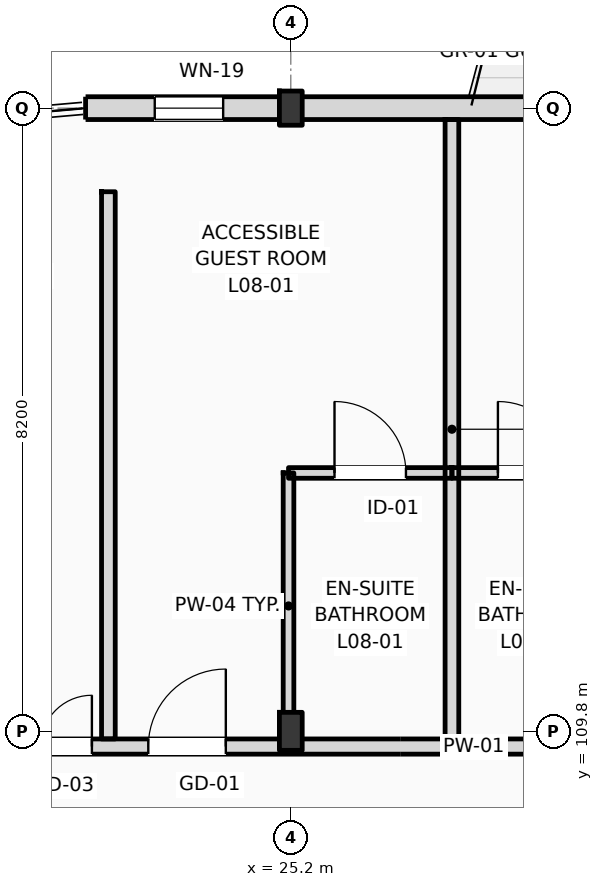
"""IFC4 building model, lengths in metres.
Left out: names, types, materials, properties, quantities, classifications, styles, units other than length and angle.
Written with IfcOpenShell. Run it as: python <this file> out.ifc"""

import sys

from ifc_helpers import new_model, si_unit, direction, frame, frame_2d, origin, origin_2d, place, context, subcontext, project, spatial, rectangle, i_section, extrude, element, fill, save


model = new_model("IFC4")
c1 = context("Model", 3, precision=1e-05, world=origin(), true_north=direction((0.0, 1.0)))
c2 = subcontext(c1, "Body", "Model", "MODEL_VIEW")
j1 = project(units=[si_unit("LENGTHUNIT", "METRE"), si_unit("PLANEANGLEUNIT", "RADIAN")], contexts=[c1])
p1 = place(None, origin())
s1 = spatial("IfcSite", under=j1, at=p1, CompositionType="ELEMENT")
p2 = place(p1, origin())
s2 = spatial("IfcBuilding", under=s1, at=p2, CompositionType="ELEMENT")
p3 = place(p2, frame((0.0, 0.0, 35.4)))
s3 = spatial("IfcBuildingStorey", under=s2, at=p3, CompositionType="ELEMENT", Elevation=35.4)
p4 = place(p3, frame((25.2, 109.8, 0.0), z_axis=(0.0, 0.0, 1.0), x_axis=(1.0, 0.0, 0.0)))
e1 = element("IfcColumn", 1, at=p4, inside=s3, PredefinedType="COLUMN", context=c2, shape_type="SweptSolid", body=[
    extrude(i_section(OverallWidth=0.3, OverallDepth=0.5, WebThickness=0.014, FlangeThickness=0.028, FilletRadius=0.027, at=origin_2d()), origin(), (0.0, 0.0, 1.0), 3.6),
])
p5 = place(p3, frame((25.2, 118.0, 0.0), z_axis=(0.0, 0.0, 1.0), x_axis=(1.0, 0.0, 0.0)))
e2 = element("IfcColumn", 2, at=p5, inside=s3, PredefinedType="COLUMN", context=c2, shape_type="SweptSolid", body=[
    extrude(i_section(OverallWidth=0.3, OverallDepth=0.45, WebThickness=0.014, FlangeThickness=0.026, FilletRadius=0.027, at=origin_2d()), origin(), (0.0, 0.0, 1.0), 3.6),
])
p6 = place(p3, frame((22.5, 118.0, 0.0), z_axis=(0.0, 0.0, 1.0), x_axis=(1.0, 0.0, 0.0)))
e3 = element("IfcWall", 3, at=p6, inside=s3, PredefinedType="STANDARD", context=c2, shape_type="SweptSolid", body=[
    extrude(rectangle(XDim=72.9, YDim=0.3, at=frame_2d((36.45, 0.0))), origin(), (0.0, 0.0, 1.0), 2.92),
])
p7 = place(p6, frame((0.91, 0.0, 0.9)))
e4 = element("IfcOpeningElement", 4, at=p7, cuts=e3, PredefinedType="OPENING", context=c2, shape_type="SweptSolid", body=[
    extrude(rectangle(XDim=0.9, YDim=1.84, at=frame_2d((0.45, 0.92))), frame((0.0, 0.16, 0.0), z_axis=(0.0, -1.0, 0.0), x_axis=(1.0, 0.0, 0.0)), (0.0, 0.0, 1.0), 0.32),
])
p8 = place(p6, frame((6.665, 0.0, 0.0)))
e5 = element("IfcOpeningElement", 5, at=p8, cuts=e3, PredefinedType="OPENING", context=c2, shape_type="SweptSolid", body=[
    extrude(rectangle(XDim=1.2, YDim=2.25, at=frame_2d((0.6, 1.125))), frame((0.0, 0.16, 0.0), z_axis=(0.0, -1.0, 0.0), x_axis=(1.0, 0.0, 0.0)), (0.0, 0.0, 1.0), 0.32),
])
p9 = place(p6, frame((11.355, 0.0, 0.9)))
e6 = element("IfcOpeningElement", 6, at=p9, cuts=e3, PredefinedType="OPENING", context=c2, shape_type="SweptSolid", body=[
    extrude(rectangle(XDim=1.1, YDim=1.5, at=frame_2d((0.55, 0.75))), frame((0.0, 0.16, 0.0), z_axis=(0.0, -1.0, 0.0), x_axis=(1.0, 0.0, 0.0)), (0.0, 0.0, 1.0), 0.32),
])
p10 = place(p6, frame((15.58, 0.0, 0.9)))
e7 = element("IfcOpeningElement", 7, at=p10, cuts=e3, PredefinedType="OPENING", context=c2, shape_type="SweptSolid", body=[
    extrude(rectangle(XDim=1.25, YDim=1.6, at=frame_2d((0.625, 0.8))), frame((0.0, 0.16, 0.0), z_axis=(0.0, -1.0, 0.0), x_axis=(1.0, 0.0, 0.0)), (0.0, 0.0, 1.0), 0.32),
])
p11 = place(p6, frame((21.08, 0.0, 0.0)))
e8 = element("IfcOpeningElement", 8, at=p11, cuts=e3, PredefinedType="OPENING", context=c2, shape_type="SweptSolid", body=[
    extrude(rectangle(XDim=1.2, YDim=2.25, at=frame_2d((0.6, 1.125))), frame((0.0, 0.16, 0.0), z_axis=(0.0, -1.0, 0.0), x_axis=(1.0, 0.0, 0.0)), (0.0, 0.0, 1.0), 0.32),
])
p12 = place(p6, frame((23.54, 0.0, 0.0)))
e9 = element("IfcOpeningElement", 9, at=p12, cuts=e3, PredefinedType="OPENING", context=c2, shape_type="SweptSolid", body=[
    extrude(rectangle(XDim=1.2, YDim=2.25, at=frame_2d((0.6, 1.125))), frame((0.0, 0.16, 0.0), z_axis=(0.0, -1.0, 0.0), x_axis=(1.0, 0.0, 0.0)), (0.0, 0.0, 1.0), 0.32),
])
p13 = place(p6, frame((28.83, 0.0, 0.9)))
e10 = element("IfcOpeningElement", 10, at=p13, cuts=e3, PredefinedType="OPENING", context=c2, shape_type="SweptSolid", body=[
    extrude(rectangle(XDim=1.75, YDim=1.84, at=frame_2d((0.875, 0.92))), frame((0.0, 0.16, 0.0), z_axis=(0.0, -1.0, 0.0), x_axis=(1.0, 0.0, 0.0)), (0.0, 0.0, 1.0), 0.32),
])
p14 = place(p6, frame((34.805, 0.0, 0.9)))
e11 = element("IfcOpeningElement", 11, at=p14, cuts=e3, PredefinedType="OPENING", context=c2, shape_type="SweptSolid", body=[
    extrude(rectangle(XDim=1.35, YDim=1.84, at=frame_2d((0.675, 0.92))), frame((0.0, 0.16, 0.0), z_axis=(0.0, -1.0, 0.0), x_axis=(1.0, 0.0, 0.0)), (0.0, 0.0, 1.0), 0.32),
])
p15 = place(p6, frame((38.105, 0.0, 0.0)))
e12 = element("IfcOpeningElement", 12, at=p15, cuts=e3, PredefinedType="OPENING", context=c2, shape_type="SweptSolid", body=[
    extrude(rectangle(XDim=1.2, YDim=2.25, at=frame_2d((0.6, 1.125))), frame((0.0, 0.16, 0.0), z_axis=(0.0, -1.0, 0.0), x_axis=(1.0, 0.0, 0.0)), (0.0, 0.0, 1.0), 0.32),
])
p16 = place(p6, frame((42.505, 0.0, 0.9)))
e13 = element("IfcOpeningElement", 13, at=p16, cuts=e3, PredefinedType="OPENING", context=c2, shape_type="SweptSolid", body=[
    extrude(rectangle(XDim=2.6, YDim=1.84, at=frame_2d((1.3, 0.92))), frame((0.0, 0.16, 0.0), z_axis=(0.0, -1.0, 0.0), x_axis=(1.0, 0.0, 0.0)), (0.0, 0.0, 1.0), 0.32),
])
p17 = place(p6, frame((46.2, 0.0, 0.9)))
e14 = element("IfcOpeningElement", 14, at=p17, cuts=e3, PredefinedType="OPENING", context=c2, shape_type="SweptSolid", body=[
    extrude(rectangle(XDim=1.8, YDim=1.84, at=frame_2d((0.9, 0.92))), frame((0.0, 0.16, 0.0), z_axis=(0.0, -1.0, 0.0), x_axis=(1.0, 0.0, 0.0)), (0.0, 0.0, 1.0), 0.32),
])
p18 = place(p6, frame((52.565, 0.0, 0.0)))
e15 = element("IfcOpeningElement", 15, at=p18, cuts=e3, PredefinedType="OPENING", context=c2, shape_type="SweptSolid", body=[
    extrude(rectangle(XDim=1.2, YDim=2.25, at=frame_2d((0.6, 1.125))), frame((0.0, 0.16, 0.0), z_axis=(0.0, -1.0, 0.0), x_axis=(1.0, 0.0, 0.0)), (0.0, 0.0, 1.0), 0.32),
])
p19 = place(p6, frame((55.305, 0.0, 0.9)))
e16 = element("IfcOpeningElement", 16, at=p19, cuts=e3, PredefinedType="OPENING", context=c2, shape_type="SweptSolid", body=[
    extrude(rectangle(XDim=1.2, YDim=1.8, at=frame_2d((0.6, 0.9))), frame((0.0, 0.16, 0.0), z_axis=(0.0, -1.0, 0.0), x_axis=(1.0, 0.0, 0.0)), (0.0, 0.0, 1.0), 0.32),
])
p20 = place(p6, frame((60.53, 0.0, 0.9)))
e17 = element("IfcOpeningElement", 17, at=p20, cuts=e3, PredefinedType="OPENING", context=c2, shape_type="SweptSolid", body=[
    extrude(rectangle(XDim=1.35, YDim=1.84, at=frame_2d((0.675, 0.92))), frame((0.0, 0.16, 0.0), z_axis=(0.0, -1.0, 0.0), x_axis=(1.0, 0.0, 0.0)), (0.0, 0.0, 1.0), 0.32),
])
p21 = place(p6, frame((65.955, 0.0, 0.9)))
e18 = element("IfcOpeningElement", 18, at=p21, cuts=e3, PredefinedType="OPENING", context=c2, shape_type="SweptSolid", body=[
    extrude(rectangle(XDim=1.35, YDim=1.84, at=frame_2d((0.675, 0.92))), frame((0.0, 0.16, 0.0), z_axis=(0.0, -1.0, 0.0), x_axis=(1.0, 0.0, 0.0)), (0.0, 0.0, 1.0), 0.32),
])
p22 = place(p6, frame((69.335, 0.0, 0.9)))
e19 = element("IfcOpeningElement", 19, at=p22, cuts=e3, PredefinedType="OPENING", context=c2, shape_type="SweptSolid", body=[
    extrude(rectangle(XDim=1.65, YDim=1.84, at=frame_2d((0.825, 0.92))), frame((0.0, 0.16, 0.0), z_axis=(0.0, -1.0, 0.0), x_axis=(1.0, 0.0, 0.0)), (0.0, 0.0, 1.0), 0.32),
])
p23 = place(p3, frame((10.65, 109.6, 0.0), z_axis=(0.0, 0.0, 1.0), x_axis=(1.0, 0.0, 0.0)))
e20 = element("IfcWall", 20, at=p23, inside=s3, PredefinedType="PARTITIONING", context=c2, shape_type="SweptSolid", body=[
    extrude(rectangle(XDim=84.61, YDim=0.2, at=frame_2d((42.305, 0.0))), origin(), (0.0, 0.0, 1.0), 2.82),
])
p24 = place(p23, frame((12.675, 0.0, 0.0)))
e21 = element("IfcOpeningElement", 21, at=p24, cuts=e20, PredefinedType="OPENING", context=c2, shape_type="SweptSolid", body=[
    extrude(rectangle(XDim=1.02, YDim=2.2, at=frame_2d((0.51, 1.1))), frame((0.0, 0.11, 0.0), z_axis=(0.0, -1.0, 0.0), x_axis=(1.0, 0.0, 0.0)), (0.0, 0.0, 1.0), 0.22),
])
p25 = place(p23, frame((19.62, 0.0, 0.0)))
e22 = element("IfcOpeningElement", 22, at=p25, cuts=e20, PredefinedType="OPENING", context=c2, shape_type="SweptSolid", body=[
    extrude(rectangle(XDim=1.02, YDim=2.2, at=frame_2d((0.51, 1.1))), frame((0.0, 0.11, 0.0), z_axis=(0.0, -1.0, 0.0), x_axis=(1.0, 0.0, 0.0)), (0.0, 0.0, 1.0), 0.22),
])
p26 = place(p23, frame((24.12, 0.0, 0.0)))
e23 = element("IfcOpeningElement", 23, at=p26, cuts=e20, PredefinedType="OPENING", context=c2, shape_type="SweptSolid", body=[
    extrude(rectangle(XDim=1.02, YDim=2.2, at=frame_2d((0.51, 1.1))), frame((0.0, 0.11, 0.0), z_axis=(0.0, -1.0, 0.0), x_axis=(1.0, 0.0, 0.0)), (0.0, 0.0, 1.0), 0.22),
])
p27 = place(p23, frame((26.47, 0.0, 0.0)))
e24 = element("IfcOpeningElement", 24, at=p27, cuts=e20, PredefinedType="OPENING", context=c2, shape_type="SweptSolid", body=[
    extrude(rectangle(XDim=1.02, YDim=2.2, at=frame_2d((0.51, 1.1))), frame((0.0, 0.11, 0.0), z_axis=(0.0, -1.0, 0.0), x_axis=(1.0, 0.0, 0.0)), (0.0, 0.0, 1.0), 0.22),
])
p28 = place(p23, frame((33.15, 0.0, 0.0)))
e25 = element("IfcOpeningElement", 25, at=p28, cuts=e20, PredefinedType="OPENING", context=c2, shape_type="SweptSolid", body=[
    extrude(rectangle(XDim=0.96, YDim=2.2, at=frame_2d((0.48, 1.1))), frame((0.0, 0.11, 0.0), z_axis=(0.0, -1.0, 0.0), x_axis=(1.0, 0.0, 0.0)), (0.0, 0.0, 1.0), 0.22),
])
p29 = place(p23, frame((35.5, 0.0, 0.0)))
e26 = element("IfcOpeningElement", 26, at=p29, cuts=e20, PredefinedType="OPENING", context=c2, shape_type="SweptSolid", body=[
    extrude(rectangle(XDim=0.96, YDim=2.2, at=frame_2d((0.48, 1.1))), frame((0.0, 0.11, 0.0), z_axis=(0.0, -1.0, 0.0), x_axis=(1.0, 0.0, 0.0)), (0.0, 0.0, 1.0), 0.22),
])
p30 = place(p23, frame((42.15, 0.0, 0.0)))
e27 = element("IfcOpeningElement", 27, at=p30, cuts=e20, PredefinedType="OPENING", context=c2, shape_type="SweptSolid", body=[
    extrude(rectangle(XDim=0.96, YDim=2.2, at=frame_2d((0.48, 1.1))), frame((0.0, 0.11, 0.0), z_axis=(0.0, -1.0, 0.0), x_axis=(1.0, 0.0, 0.0)), (0.0, 0.0, 1.0), 0.22),
])
p31 = place(p23, frame((47.15, 0.0, 0.0)))
e28 = element("IfcOpeningElement", 28, at=p31, cuts=e20, PredefinedType="OPENING", context=c2, shape_type="SweptSolid", body=[
    extrude(rectangle(XDim=0.96, YDim=2.2, at=frame_2d((0.48, 1.1))), frame((0.0, 0.11, 0.0), z_axis=(0.0, -1.0, 0.0), x_axis=(1.0, 0.0, 0.0)), (0.0, 0.0, 1.0), 0.22),
])
p32 = place(p23, frame((51.15, 0.0, 0.0)))
e29 = element("IfcOpeningElement", 29, at=p32, cuts=e20, PredefinedType="OPENING", context=c2, shape_type="SweptSolid", body=[
    extrude(rectangle(XDim=0.96, YDim=2.2, at=frame_2d((0.48, 1.1))), frame((0.0, 0.11, 0.0), z_axis=(0.0, -1.0, 0.0), x_axis=(1.0, 0.0, 0.0)), (0.0, 0.0, 1.0), 0.22),
])
p33 = place(p23, frame((55.65, 0.0, 0.0)))
e30 = element("IfcOpeningElement", 30, at=p33, cuts=e20, PredefinedType="OPENING", context=c2, shape_type="SweptSolid", body=[
    extrude(rectangle(XDim=0.96, YDim=2.2, at=frame_2d((0.48, 1.1))), frame((0.0, 0.11, 0.0), z_axis=(0.0, -1.0, 0.0), x_axis=(1.0, 0.0, 0.0)), (0.0, 0.0, 1.0), 0.22),
])
p34 = place(p23, frame((58.0, 0.0, 0.0)))
e31 = element("IfcOpeningElement", 31, at=p34, cuts=e20, PredefinedType="OPENING", context=c2, shape_type="SweptSolid", body=[
    extrude(rectangle(XDim=0.96, YDim=2.2, at=frame_2d((0.48, 1.1))), frame((0.0, 0.11, 0.0), z_axis=(0.0, -1.0, 0.0), x_axis=(1.0, 0.0, 0.0)), (0.0, 0.0, 1.0), 0.22),
])
p35 = place(p23, frame((64.65, 0.0, 0.0)))
e32 = element("IfcOpeningElement", 32, at=p35, cuts=e20, PredefinedType="OPENING", context=c2, shape_type="SweptSolid", body=[
    extrude(rectangle(XDim=0.96, YDim=2.2, at=frame_2d((0.48, 1.1))), frame((0.0, 0.11, 0.0), z_axis=(0.0, -1.0, 0.0), x_axis=(1.0, 0.0, 0.0)), (0.0, 0.0, 1.0), 0.22),
])
p36 = place(p23, frame((66.75, 0.0, 0.0)))
e33 = element("IfcOpeningElement", 33, at=p36, cuts=e20, PredefinedType="OPENING", context=c2, shape_type="SweptSolid", body=[
    extrude(rectangle(XDim=0.96, YDim=2.2, at=frame_2d((0.48, 1.1))), frame((0.0, 0.11, 0.0), z_axis=(0.0, -1.0, 0.0), x_axis=(1.0, 0.0, 0.0)), (0.0, 0.0, 1.0), 0.22),
])
p37 = place(p23, frame((73.65, 0.0, 0.0)))
e34 = element("IfcOpeningElement", 34, at=p37, cuts=e20, PredefinedType="OPENING", context=c2, shape_type="SweptSolid", body=[
    extrude(rectangle(XDim=0.96, YDim=2.2, at=frame_2d((0.48, 1.1))), frame((0.0, 0.11, 0.0), z_axis=(0.0, -1.0, 0.0), x_axis=(1.0, 0.0, 0.0)), (0.0, 0.0, 1.0), 0.22),
])
p38 = place(p23, frame((78.4, 0.0, 0.0)))
e35 = element("IfcOpeningElement", 35, at=p38, cuts=e20, PredefinedType="OPENING", context=c2, shape_type="SweptSolid", body=[
    extrude(rectangle(XDim=0.96, YDim=2.2, at=frame_2d((0.48, 1.1))), frame((0.0, 0.11, 0.0), z_axis=(0.0, -1.0, 0.0), x_axis=(1.0, 0.0, 0.0)), (0.0, 0.0, 1.0), 0.22),
])
p39 = place(p23, frame((80.455, 0.0, 0.0)))
e36 = element("IfcOpeningElement", 36, at=p39, cuts=e20, PredefinedType="OPENING", context=c2, shape_type="SweptSolid", body=[
    extrude(rectangle(XDim=0.96, YDim=2.2, at=frame_2d((0.48, 1.1))), frame((0.0, 0.11, 0.0), z_axis=(0.0, -1.0, 0.0), x_axis=(1.0, 0.0, 0.0)), (0.0, 0.0, 1.0), 0.22),
])
p40 = place(p23, frame((2.716, 0.0, 0.0)))
e37 = element("IfcOpeningElement", 37, at=p40, cuts=e20, PredefinedType="OPENING", context=c2, shape_type="SweptSolid", body=[
    extrude(rectangle(XDim=1.35, YDim=2.25, at=frame_2d((0.675, 1.125))), frame((0.0, 0.11, 0.0), z_axis=(0.0, -1.0, 0.0), x_axis=(1.0, 0.0, 0.0)), (0.0, 0.0, 1.0), 0.22),
])
p41 = place(p23, frame((6.65, 0.0, 0.0)))
e38 = element("IfcOpeningElement", 38, at=p41, cuts=e20, PredefinedType="OPENING", context=c2, shape_type="SweptSolid", body=[
    extrude(rectangle(XDim=1.35, YDim=2.25, at=frame_2d((0.675, 1.125))), frame((0.0, 0.11, 0.0), z_axis=(0.0, -1.0, 0.0), x_axis=(1.0, 0.0, 0.0)), (0.0, 0.0, 1.0), 0.22),
])
p42 = place(p23, frame((10.583, 0.0, 0.0)))
e39 = element("IfcOpeningElement", 39, at=p42, cuts=e20, PredefinedType="OPENING", context=c2, shape_type="SweptSolid", body=[
    extrude(rectangle(XDim=1.35, YDim=2.25, at=frame_2d((0.675, 1.125))), frame((0.0, 0.11, 0.0), z_axis=(0.0, -1.0, 0.0), x_axis=(1.0, 0.0, 0.0)), (0.0, 0.0, 1.0), 0.22),
])
p43 = place(p3, frame((27.32, 109.7, 0.0), z_axis=(0.0, 0.0, 1.0), x_axis=(0.0, 1.0, 0.0)))
e40 = element("IfcWall", 40, at=p43, inside=s3, PredefinedType="PARTITIONING", context=c2, shape_type="SweptSolid", body=[
    extrude(rectangle(XDim=8.15, YDim=0.18, at=frame_2d((4.075, 0.0))), origin(), (0.0, 0.0, 1.0), 3.38),
])
p44 = place(p3, frame((25.17, 109.7, 0.0), z_axis=(0.0, 0.0, 1.0), x_axis=(0.0, 1.0, 0.0)))
e41 = element("IfcWall", 41, at=p44, inside=s3, PredefinedType="PARTITIONING", context=c2, shape_type="SweptSolid", body=[
    extrude(rectangle(XDim=3.5, YDim=0.14, at=frame_2d((1.75, 0.0))), origin(), (0.0, 0.0, 1.0), 3.01),
])
p45 = place(p3, frame((25.17, 113.2, 0.0), z_axis=(0.0, 0.0, 1.0), x_axis=(1.0, 0.0, 0.0)))
e42 = element("IfcWall", 42, at=p45, inside=s3, PredefinedType="PARTITIONING", context=c2, shape_type="SweptSolid", body=[
    extrude(rectangle(XDim=2.15, YDim=0.14, at=frame_2d((1.075, 0.0))), origin(), (0.0, 0.0, 1.0), 3.38),
])
p46 = place(p45, frame((0.605, 0.0, 0.0)))
e43 = element("IfcOpeningElement", 43, at=p46, cuts=e42, PredefinedType="OPENING", context=c2, shape_type="SweptSolid", body=[
    extrude(rectangle(XDim=0.94, YDim=2.15, at=frame_2d((0.47, 1.075))), frame((0.0, 0.08, 0.0), z_axis=(0.0, -1.0, 0.0), x_axis=(1.0, 0.0, 0.0)), (0.0, 0.0, 1.0), 0.16),
])
p47 = place(p3, frame((27.32, 113.2, 0.0), z_axis=(0.0, 0.0, 1.0), x_axis=(1.0, 0.0, 0.0)))
e44 = element("IfcWall", 44, at=p47, inside=s3, PredefinedType="PARTITIONING", context=c2, shape_type="SweptSolid", body=[
    extrude(rectangle(XDim=2.15, YDim=0.14, at=frame_2d((1.075, 0.0))), origin(), (0.0, 0.0, 1.0), 3.38),
])
p48 = place(p47, frame((0.605, 0.0, 0.0)))
e45 = element("IfcOpeningElement", 45, at=p48, cuts=e44, PredefinedType="OPENING", context=c2, shape_type="SweptSolid", body=[
    extrude(rectangle(XDim=0.94, YDim=2.15, at=frame_2d((0.47, 1.075))), frame((0.0, 0.08, 0.0), z_axis=(0.0, -1.0, 0.0), x_axis=(1.0, 0.0, 0.0)), (0.0, 0.0, 1.0), 0.16),
])
p49 = place(p3, frame((22.8, 109.7, 0.0), z_axis=(0.0, 0.0, 1.0), x_axis=(0.0, 1.0, 0.0)))
e46 = element("IfcWall", 46, at=p49, inside=s3, PredefinedType="PARTITIONING", context=c2, shape_type="SweptSolid", body=[
    extrude(rectangle(XDim=7.2, YDim=0.18, at=frame_2d((3.6, 0.0))), origin(), (0.0, 0.0, 1.0), 3.38),
])
p50 = place(p7, origin())
e47 = element("IfcWindow", 47, at=p50, inside=s3, PartitioningType="DOUBLE_PANEL_VERTICAL", PredefinedType="WINDOW", context=c2, shape_type="SweptSolid", body=[
    extrude(rectangle(XDim=0.9, YDim=1.84, at=frame_2d((0.45, 0.92))), frame((0.0, 0.03, 0.0), z_axis=(0.0, -1.0, 0.0), x_axis=(1.0, 0.0, 0.0)), (0.0, 0.0, 1.0), 0.06),
])
fill(e4, e47)
p51 = place(p24, origin())
e48 = element("IfcDoor", 48, at=p51, inside=s3, OperationType="SINGLE_SWING_RIGHT", PredefinedType="DOOR", context=c2, shape_type="SweptSolid", body=[
    extrude(rectangle(XDim=1.02, YDim=2.2, at=frame_2d((0.51, 1.1))), frame((0.0, 0.025, 0.0), z_axis=(0.0, -1.0, 0.0), x_axis=(1.0, 0.0, 0.0)), (0.0, 0.0, 1.0), 0.05),
])
fill(e21, e48)
p52 = place(p46, origin())
e49 = element("IfcDoor", 49, at=p52, inside=s3, OperationType="SINGLE_SWING_LEFT", PredefinedType="DOOR", context=c2, shape_type="SweptSolid", body=[
    extrude(rectangle(XDim=0.94, YDim=2.15, at=frame_2d((0.47, 1.075))), frame((0.0, 0.025, 0.0), z_axis=(0.0, -1.0, 0.0), x_axis=(1.0, 0.0, 0.0)), (0.0, 0.0, 1.0), 0.05),
])
fill(e43, e49)
p53 = place(p48, origin())
e50 = element("IfcDoor", 50, at=p53, inside=s3, OperationType="SINGLE_SWING_LEFT", PredefinedType="DOOR", context=c2, shape_type="SweptSolid", body=[
    extrude(rectangle(XDim=0.94, YDim=2.15, at=frame_2d((0.47, 1.075))), frame((0.0, 0.025, 0.0), z_axis=(0.0, -1.0, 0.0), x_axis=(1.0, 0.0, 0.0)), (0.0, 0.0, 1.0), 0.05),
])
fill(e45, e50)
p54 = place(p42, origin())
e51 = element("IfcDoor", 51, at=p54, inside=s3, OperationType="DOUBLE_SWING_LEFT", PredefinedType="DOOR", context=c2, shape_type="SweptSolid", body=[
    extrude(rectangle(XDim=1.35, YDim=2.25, at=frame_2d((0.675, 1.125))), frame((0.0, 0.025, 0.0), z_axis=(0.0, -1.0, 0.0), x_axis=(1.0, 0.0, 0.0)), (0.0, 0.0, 1.0), 0.05),
])
fill(e39, e51)
save(model, sys.argv[1])
